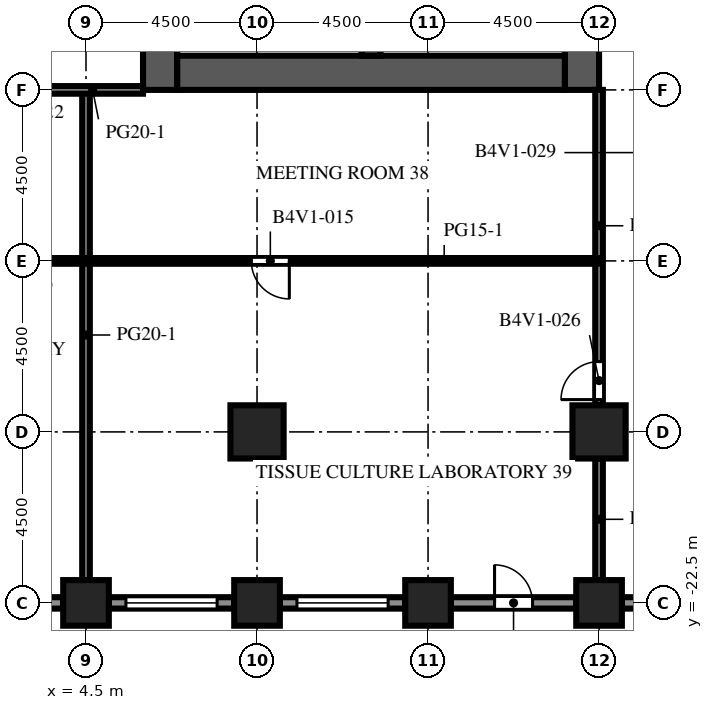
"""IFC4 building model, lengths in metres.
Left out: names, types, materials, properties, quantities, classifications, styles, units other than length and angle.
Written with IfcOpenShell. Run it as: python <this file> out.ifc"""

import sys

from ifc_helpers import new_model, si_unit, direction, frame, frame_2d, origin, origin_2d, place, context, subcontext, project, spatial, rectangle, extrude, element, fill, save


model = new_model("IFC4")
c1 = context("Model", 3, precision=1e-05, world=origin(), true_north=direction((0.0, 1.0)))
c2 = subcontext(c1, "Body", "Model", "MODEL_VIEW")
j1 = project(units=[si_unit("LENGTHUNIT", "METRE"), si_unit("PLANEANGLEUNIT", "RADIAN")], contexts=[c1])
p1 = place(None, origin())
s1 = spatial("IfcSite", under=j1, at=p1, CompositionType="ELEMENT")
p2 = place(p1, origin())
s2 = spatial("IfcBuilding", under=s1, at=p2, CompositionType="ELEMENT")
p3 = place(p2, frame((0.0, 0.0, 129.0)))
s3 = spatial("IfcBuildingStorey", under=s2, at=p3, CompositionType="ELEMENT", Elevation=129.0)
for number, where, z_axis, x_axis in (
    (1, (4.5, -22.5, 0.0), (0.0, 0.0, 1.0), (1.0, 0.0, 0.0)),
    (2, (9.0, -22.5, 0.0), (0.0, 0.0, 1.0), (1.0, 0.0, 0.0)),
    (3, (13.5, -22.5, 0.0), (0.0, 0.0, 1.0), (1.0, 0.0, 0.0)),
    (4, (18.0, -22.5, 0.0), (0.0, 0.0, 1.0), (1.0, 0.0, 0.0)),
):
    element("IfcColumn", number, at=place(p3, frame(where, z_axis=z_axis, x_axis=x_axis)), inside=s3, PredefinedType="COLUMN", context=c2, shape_type="SweptSolid", body=[
        extrude(rectangle(XDim=1.2, YDim=1.2, at=origin_2d()), origin(), (0.0, 0.0, 1.0), 4.1),
    ])
for number, where, z_axis, x_axis in (
    (5, (9.0, -18.0, 0.0), (0.0, 0.0, 1.0), (1.0, 0.0, 0.0)),
    (6, (18.0, -18.0, 0.0), (0.0, 0.0, 1.0), (1.0, 0.0, 0.0)),
):
    element("IfcColumn", number, at=place(p3, frame(where, z_axis=z_axis, x_axis=x_axis)), inside=s3, PredefinedType="COLUMN", context=c2, shape_type="SweptSolid", body=[
        extrude(rectangle(XDim=1.4, YDim=1.4, at=origin_2d()), origin(), (0.0, 0.0, 1.0), 4.1),
    ])
p4 = place(p3, frame((6.45, -9.0, 0.0), z_axis=(0.0, 0.0, 1.0), x_axis=(0.0, 1.0, 0.0)))
e7 = element("IfcWall", 7, at=p4, inside=s3, PredefinedType="SHEAR", context=c2, shape_type="SweptSolid", body=[
    extrude(rectangle(XDim=27.5, YDim=0.9, at=frame_2d((13.75, 0.0))), origin(), (0.0, 0.0, 1.0), 4.1),
])
p5 = place(p4, frame((12.55, 0.0, 0.0)))
e8 = element("IfcOpeningElement", 8, at=p5, cuts=e7, PredefinedType="OPENING", context=c2, shape_type="SweptSolid", body=[
    extrude(rectangle(XDim=2.4, YDim=2.4, at=frame_2d((1.2, 1.2))), frame((0.0, 0.46, 0.0), z_axis=(0.0, -1.0, 0.0), x_axis=(1.0, 0.0, 0.0)), (0.0, 0.0, 1.0), 0.92),
])
p6 = place(p4, frame((3.975, 0.0, 0.0)))
e9 = element("IfcOpeningElement", 9, at=p6, cuts=e7, PredefinedType="OPENING", context=c2, shape_type="SweptSolid", body=[
    extrude(rectangle(XDim=1.2, YDim=2.1, at=frame_2d((0.6, 1.05))), frame((0.0, 0.46, 0.0), z_axis=(0.0, -1.0, 0.0), x_axis=(1.0, 0.0, 0.0)), (0.0, 0.0, 1.0), 0.92),
])
p7 = place(p4, frame((22.325, 0.0, 0.0)))
e10 = element("IfcOpeningElement", 10, at=p7, cuts=e7, PredefinedType="OPENING", context=c2, shape_type="SweptSolid", body=[
    extrude(rectangle(XDim=1.2, YDim=2.1, at=frame_2d((0.6, 1.05))), frame((0.0, 0.46, 0.0), z_axis=(0.0, -1.0, 0.0), x_axis=(1.0, 0.0, 0.0)), (0.0, 0.0, 1.0), 0.92),
])
p8 = place(p3, frame((17.55, -9.0, 0.0), z_axis=(0.0, 0.0, 1.0), x_axis=(0.0, 1.0, 0.0)))
e11 = element("IfcWall", 11, at=p8, inside=s3, PredefinedType="SHEAR", context=c2, shape_type="SweptSolid", body=[
    extrude(rectangle(XDim=27.5, YDim=0.9, at=frame_2d((13.75, 0.0))), origin(), (0.0, 0.0, 1.0), 4.1),
])
p9 = place(p8, frame((12.55, 0.0, 0.0)))
e12 = element("IfcOpeningElement", 12, at=p9, cuts=e11, PredefinedType="OPENING", context=c2, shape_type="SweptSolid", body=[
    extrude(rectangle(XDim=2.4, YDim=2.4, at=frame_2d((1.2, 1.2))), frame((0.0, 0.46, 0.0), z_axis=(0.0, -1.0, 0.0), x_axis=(1.0, 0.0, 0.0)), (0.0, 0.0, 1.0), 0.92),
])
p10 = place(p8, frame((6.825, 0.0, 0.0)))
e13 = element("IfcOpeningElement", 13, at=p10, cuts=e11, PredefinedType="OPENING", context=c2, shape_type="SweptSolid", body=[
    extrude(rectangle(XDim=1.2, YDim=2.1, at=frame_2d((0.6, 1.05))), frame((0.0, 0.46, 0.0), z_axis=(0.0, -1.0, 0.0), x_axis=(1.0, 0.0, 0.0)), (0.0, 0.0, 1.0), 0.92),
])
p11 = place(p8, frame((19.475, 0.0, 0.0)))
e14 = element("IfcOpeningElement", 14, at=p11, cuts=e11, PredefinedType="OPENING", context=c2, shape_type="SweptSolid", body=[
    extrude(rectangle(XDim=1.2, YDim=2.1, at=frame_2d((0.6, 1.05))), frame((0.0, 0.46, 0.0), z_axis=(0.0, -1.0, 0.0), x_axis=(1.0, 0.0, 0.0)), (0.0, 0.0, 1.0), 0.92),
])
p12 = place(p3, frame((6.9, -8.55, 0.0), z_axis=(0.0, 0.0, 1.0), x_axis=(1.0, 0.0, 0.0)))
e15 = element("IfcWall", 15, at=p12, inside=s3, PredefinedType="SHEAR", context=c2, shape_type="SweptSolid", body=[
    extrude(rectangle(XDim=10.2, YDim=0.9, at=frame_2d((5.1, 0.0))), origin(), (0.0, 0.0, 1.0), 4.1),
])
p13 = place(p3, frame((12.0, -8.1, 0.0), z_axis=(0.0, 0.0, 1.0), x_axis=(0.0, 1.0, 0.0)))
e16 = element("IfcWall", 16, at=p13, inside=s3, PredefinedType="SHEAR", context=c2, shape_type="SweptSolid", body=[
    extrude(rectangle(XDim=7.35, YDim=0.5, at=frame_2d((3.675, 0.0))), origin(), (0.0, 0.0, 1.0), 4.1),
])
p14 = place(p3, frame((3.9, -22.5, 0.0), z_axis=(0.0, 0.0, 1.0), x_axis=(-1.0, 0.0, 0.0)))
e17 = element("IfcWall", 17, at=p14, inside=s3, PredefinedType="SOLIDWALL", context=c2, shape_type="SweptSolid", body=[
    extrude(rectangle(XDim=3.3, YDim=0.3, at=frame_2d((1.65, 0.0))), origin(), (0.0, 0.0, 1.0), 2.75),
])
p15 = place(p14, frame((0.45, 0.0, 0.8)))
e18 = element("IfcOpeningElement", 18, at=p15, cuts=e17, PredefinedType="OPENING", context=c2, shape_type="SweptSolid", body=[
    extrude(rectangle(XDim=2.4, YDim=1.7, at=frame_2d((1.2, 0.85))), frame((0.0, 0.16, 0.0), z_axis=(0.0, -1.0, 0.0), x_axis=(1.0, 0.0, 0.0)), (0.0, 0.0, 1.0), 0.32),
])
p16 = place(p3, frame((8.4, -22.5, 0.0), z_axis=(0.0, 0.0, 1.0), x_axis=(-1.0, 0.0, 0.0)))
e19 = element("IfcWall", 19, at=p16, inside=s3, PredefinedType="SOLIDWALL", context=c2, shape_type="SweptSolid", body=[
    extrude(rectangle(XDim=3.3, YDim=0.3, at=frame_2d((1.65, 0.0))), origin(), (0.0, 0.0, 1.0), 2.75),
])
p17 = place(p16, frame((0.45, 0.0, 0.8)))
e20 = element("IfcOpeningElement", 20, at=p17, cuts=e19, PredefinedType="OPENING", context=c2, shape_type="SweptSolid", body=[
    extrude(rectangle(XDim=2.4, YDim=1.7, at=frame_2d((1.2, 0.85))), frame((0.0, 0.16, 0.0), z_axis=(0.0, -1.0, 0.0), x_axis=(1.0, 0.0, 0.0)), (0.0, 0.0, 1.0), 0.32),
])
p18 = place(p3, frame((12.9, -22.5, 0.0), z_axis=(0.0, 0.0, 1.0), x_axis=(-1.0, 0.0, 0.0)))
e21 = element("IfcWall", 21, at=p18, inside=s3, PredefinedType="SOLIDWALL", context=c2, shape_type="SweptSolid", body=[
    extrude(rectangle(XDim=3.3, YDim=0.3, at=frame_2d((1.65, 0.0))), origin(), (0.0, 0.0, 1.0), 2.75),
])
p19 = place(p18, frame((0.45, 0.0, 0.8)))
e22 = element("IfcOpeningElement", 22, at=p19, cuts=e21, PredefinedType="OPENING", context=c2, shape_type="SweptSolid", body=[
    extrude(rectangle(XDim=2.4, YDim=1.7, at=frame_2d((1.2, 0.85))), frame((0.0, 0.16, 0.0), z_axis=(0.0, -1.0, 0.0), x_axis=(1.0, 0.0, 0.0)), (0.0, 0.0, 1.0), 0.32),
])
p20 = place(p3, frame((17.4, -22.5, 0.0), z_axis=(0.0, 0.0, 1.0), x_axis=(-1.0, 0.0, 0.0)))
e23 = element("IfcWall", 23, at=p20, inside=s3, PredefinedType="SOLIDWALL", context=c2, shape_type="SweptSolid", body=[
    extrude(rectangle(XDim=3.3, YDim=0.3, at=frame_2d((1.65, 0.0))), origin(), (0.0, 0.0, 1.0), 2.75),
])
p21 = place(p20, frame((1.15, 0.0, 0.0)))
e24 = element("IfcOpeningElement", 24, at=p21, cuts=e23, PredefinedType="OPENING", context=c2, shape_type="SweptSolid", body=[
    extrude(rectangle(XDim=1.0, YDim=2.2, at=frame_2d((0.5, 1.1))), frame((0.0, 0.16, 0.0), z_axis=(0.0, -1.0, 0.0), x_axis=(1.0, 0.0, 0.0)), (0.0, 0.0, 1.0), 0.32),
])
p22 = place(p3, frame((21.9, -22.5, 0.0), z_axis=(0.0, 0.0, 1.0), x_axis=(-1.0, 0.0, 0.0)))
e25 = element("IfcWall", 25, at=p22, inside=s3, PredefinedType="SOLIDWALL", context=c2, shape_type="SweptSolid", body=[
    extrude(rectangle(XDim=3.3, YDim=0.3, at=frame_2d((1.65, 0.0))), origin(), (0.0, 0.0, 1.0), 2.75),
])
p23 = place(p22, frame((1.575, 0.0, 0.8)))
e26 = element("IfcOpeningElement", 26, at=p23, cuts=e25, PredefinedType="OPENING", context=c2, shape_type="SweptSolid", body=[
    extrude(rectangle(XDim=1.2, YDim=1.7, at=frame_2d((0.6, 0.85))), frame((0.0, 0.16, 0.0), z_axis=(0.0, -1.0, 0.0), x_axis=(1.0, 0.0, 0.0)), (0.0, 0.0, 1.0), 0.32),
])
p24 = place(p3, frame((8.4, -8.1, 0.0), z_axis=(0.0, 0.0, 1.0), x_axis=(0.0, 1.0, 0.0)))
e27 = element("IfcWall", 27, at=p24, inside=s3, PredefinedType="PARTITIONING", context=c2, shape_type="SweptSolid", body=[
    extrude(rectangle(XDim=2.205, YDim=0.1, at=frame_2d((1.103, 0.0))), origin(), (0.0, 0.0, 1.0), 3.65),
])
p25 = place(p24, frame((0.603, 0.0, 0.0)))
e28 = element("IfcOpeningElement", 28, at=p25, cuts=e27, PredefinedType="OPENING", context=c2, shape_type="SweptSolid", body=[
    extrude(rectangle(XDim=1.0, YDim=2.1, at=frame_2d((0.5, 1.05))), frame((0.0, 0.06, 0.0), z_axis=(0.0, -1.0, 0.0), x_axis=(1.0, 0.0, 0.0)), (0.0, 0.0, 1.0), 0.12),
])
p26 = place(p3, frame((4.5, -21.9, 0.0), z_axis=(0.0, 0.0, 1.0), x_axis=(0.0, 1.0, 0.0)))
e29 = element("IfcWall", 29, at=p26, inside=s3, PredefinedType="PARTITIONING", context=c2, shape_type="SweptSolid", body=[
    extrude(rectangle(XDim=12.9, YDim=0.2, at=frame_2d((6.45, 0.0))), origin(), (0.0, 0.0, 1.0), 3.65),
])
p27 = place(p3, frame((18.0, -21.9, 0.0), z_axis=(0.0, 0.0, 1.0), x_axis=(0.0, 1.0, 0.0)))
e30 = element("IfcWall", 30, at=p27, inside=s3, PredefinedType="PARTITIONING", context=c2, shape_type="SweptSolid", body=[
    extrude(rectangle(XDim=3.2, YDim=0.2, at=frame_2d((1.6, 0.0))), origin(), (0.0, 0.0, 1.0), 3.65),
])
p28 = place(p3, frame((18.0, -17.3, 0.0), z_axis=(0.0, 0.0, 1.0), x_axis=(0.0, 1.0, 0.0)))
e31 = element("IfcWall", 31, at=p28, inside=s3, PredefinedType="PARTITIONING", context=c2, shape_type="SweptSolid", body=[
    extrude(rectangle(XDim=8.3, YDim=0.2, at=frame_2d((4.15, 0.0))), origin(), (0.0, 0.0, 1.0), 3.65),
])
p29 = place(p28, frame((0.15, 0.0, 0.0)))
e32 = element("IfcOpeningElement", 32, at=p29, cuts=e31, PredefinedType="OPENING", context=c2, shape_type="SweptSolid", body=[
    extrude(rectangle(XDim=1.0, YDim=2.1, at=frame_2d((0.5, 1.05))), frame((0.0, 0.11, 0.0), z_axis=(0.0, -1.0, 0.0), x_axis=(1.0, 0.0, 0.0)), (0.0, 0.0, 1.0), 0.22),
])
p30 = place(p3, frame((-10.5, -13.5, 0.0), z_axis=(0.0, 0.0, 1.0), x_axis=(1.0, 0.0, 0.0)))
e33 = element("IfcWall", 33, at=p30, inside=s3, PredefinedType="PARTITIONING", context=c2, shape_type="SweptSolid", body=[
    extrude(rectangle(XDim=28.5, YDim=0.15, at=frame_2d((14.25, 0.0))), origin(), (0.0, 0.0, 1.0), 3.65),
])
p31 = place(p30, frame((3.6, 0.0, 0.0)))
e34 = element("IfcOpeningElement", 34, at=p31, cuts=e33, PredefinedType="OPENING", context=c2, shape_type="SweptSolid", body=[
    extrude(rectangle(XDim=1.0, YDim=2.1, at=frame_2d((0.5, 1.05))), frame((0.0, 0.085, 0.0), z_axis=(0.0, -1.0, 0.0), x_axis=(1.0, 0.0, 0.0)), (0.0, 0.0, 1.0), 0.17),
])
p32 = place(p30, frame((12.6, 0.0, 0.0)))
e35 = element("IfcOpeningElement", 35, at=p32, cuts=e33, PredefinedType="OPENING", context=c2, shape_type="SweptSolid", body=[
    extrude(rectangle(XDim=1.0, YDim=2.1, at=frame_2d((0.5, 1.05))), frame((0.0, 0.085, 0.0), z_axis=(0.0, -1.0, 0.0), x_axis=(1.0, 0.0, 0.0)), (0.0, 0.0, 1.0), 0.17),
])
p33 = place(p30, frame((19.35, 0.0, 0.0)))
e36 = element("IfcOpeningElement", 36, at=p33, cuts=e33, PredefinedType="OPENING", context=c2, shape_type="SweptSolid", body=[
    extrude(rectangle(XDim=1.0, YDim=2.1, at=frame_2d((0.5, 1.05))), frame((0.0, 0.085, 0.0), z_axis=(0.0, -1.0, 0.0), x_axis=(1.0, 0.0, 0.0)), (0.0, 0.0, 1.0), 0.17),
])
p34 = place(p3, frame((6.0, -9.0, 0.0), z_axis=(0.0, 0.0, 1.0), x_axis=(-1.0, 0.0, 0.0)))
e37 = element("IfcWall", 37, at=p34, inside=s3, PredefinedType="PARTITIONING", context=c2, shape_type="SweptSolid", body=[
    extrude(rectangle(XDim=4.5, YDim=0.2, at=frame_2d((2.25, 0.0))), origin(), (0.0, 0.0, 1.0), 3.65),
])
p35 = place(p34, frame((2.65, 0.0, 0.0)))
e38 = element("IfcOpeningElement", 38, at=p35, cuts=e37, PredefinedType="OPENING", context=c2, shape_type="SweptSolid", body=[
    extrude(rectangle(XDim=1.0, YDim=2.1, at=frame_2d((0.5, 1.05))), frame((0.0, 0.11, 0.0), z_axis=(0.0, -1.0, 0.0), x_axis=(1.0, 0.0, 0.0)), (0.0, 0.0, 1.0), 0.22),
])
p36 = place(p17, origin())
e39 = element("IfcWindow", 39, at=p36, inside=s3, PartitioningType="SINGLE_PANEL", PredefinedType="WINDOW", context=c2, shape_type="SweptSolid", body=[
    extrude(rectangle(XDim=2.4, YDim=1.7, at=frame_2d((1.2, 0.85))), frame((0.0, 0.03, 0.0), z_axis=(0.0, -1.0, 0.0), x_axis=(1.0, 0.0, 0.0)), (0.0, 0.0, 1.0), 0.06),
])
fill(e20, e39)
p37 = place(p19, origin())
e40 = element("IfcWindow", 40, at=p37, inside=s3, PartitioningType="SINGLE_PANEL", PredefinedType="WINDOW", context=c2, shape_type="SweptSolid", body=[
    extrude(rectangle(XDim=2.4, YDim=1.7, at=frame_2d((1.2, 0.85))), frame((0.0, 0.03, 0.0), z_axis=(0.0, -1.0, 0.0), x_axis=(1.0, 0.0, 0.0)), (0.0, 0.0, 1.0), 0.06),
])
fill(e22, e40)
p38 = place(p21, origin())
e41 = element("IfcDoor", 41, at=p38, inside=s3, OperationType="SINGLE_SWING_RIGHT", PredefinedType="DOOR", context=c2, shape_type="SweptSolid", body=[
    extrude(rectangle(XDim=1.0, YDim=2.2, at=frame_2d((0.5, 1.1))), frame((0.0, 0.025, 0.0), z_axis=(0.0, -1.0, 0.0), x_axis=(1.0, 0.0, 0.0)), (0.0, 0.0, 1.0), 0.05),
])
fill(e24, e41)
p39 = place(p33, origin())
e42 = element("IfcDoor", 42, at=p39, inside=s3, OperationType="SINGLE_SWING_RIGHT", PredefinedType="DOOR", context=c2, shape_type="SweptSolid", body=[
    extrude(rectangle(XDim=1.0, YDim=2.1, at=frame_2d((0.5, 1.05))), frame((0.0, 0.025, 0.0), z_axis=(0.0, -1.0, 0.0), x_axis=(1.0, 0.0, 0.0)), (0.0, 0.0, 1.0), 0.05),
])
fill(e36, e42)
p40 = place(p29, origin())
e43 = element("IfcDoor", 43, at=p40, inside=s3, OperationType="SINGLE_SWING_LEFT", PredefinedType="DOOR", context=c2, shape_type="SweptSolid", body=[
    extrude(rectangle(XDim=1.0, YDim=2.1, at=frame_2d((0.5, 1.05))), frame((0.0, 0.025, 0.0), z_axis=(0.0, -1.0, 0.0), x_axis=(1.0, 0.0, 0.0)), (0.0, 0.0, 1.0), 0.05),
])
fill(e32, e43)
save(model, sys.argv[1])
